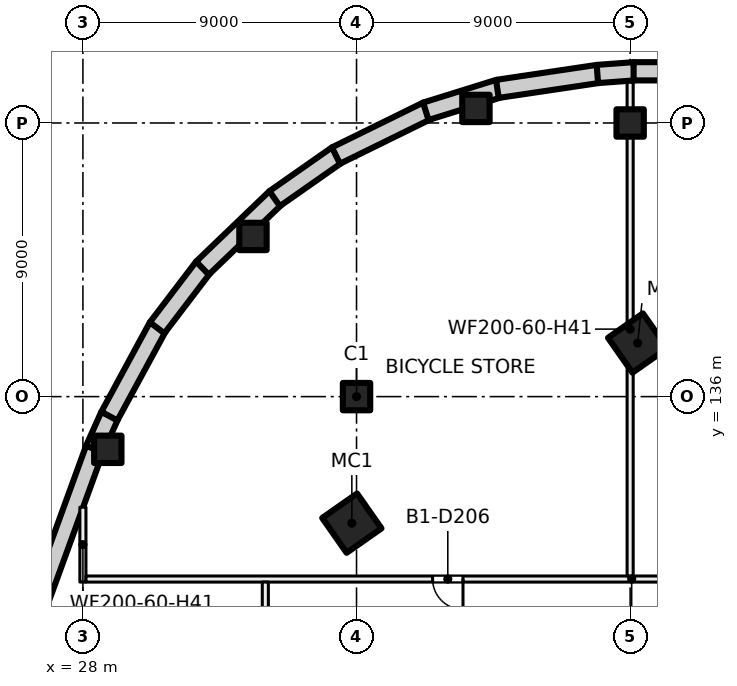
"""IFC4 building model, lengths in metres.
Left out: names, types, materials, properties, quantities, classifications, styles, units other than length and angle.
Written with IfcOpenShell. Run it as: python <this file> out.ifc"""

import sys

from ifc_helpers import new_model, si_unit, direction, frame, frame_2d, origin, origin_2d, place, context, subcontext, project, spatial, rectangle, hollow_rectangle, extrude, element, fill, save


model = new_model("IFC4")
c1 = context("Model", 3, precision=1e-05, world=origin(), true_north=direction((0.0, 1.0)))
c2 = subcontext(c1, "Body", "Model", "MODEL_VIEW")
j1 = project(units=[si_unit("LENGTHUNIT", "METRE"), si_unit("PLANEANGLEUNIT", "RADIAN")], contexts=[c1])
p1 = place(None, origin())
s1 = spatial("IfcSite", under=j1, at=p1, CompositionType="ELEMENT")
p2 = place(p1, origin())
s2 = spatial("IfcBuilding", under=s1, at=p2, CompositionType="ELEMENT")
p3 = place(p2, frame((0.0, 0.0, -4.5)))
s3 = spatial("IfcBuildingStorey", under=s2, at=p3, CompositionType="ELEMENT", Elevation=-4.5)
p4 = place(p3, frame((12.199, 89.809, 0.0), z_axis=(0.0, 0.0, 1.0), x_axis=(0.342018444468, 0.939693239118, 0.0)))
e1 = element("IfcWall", 1, at=p4, inside=s3, PredefinedType="SHEAR", context=c2, shape_type="SweptSolid", body=[
    extrude(rectangle(XDim=47.334, YDim=0.6, at=frame_2d((23.667, 0.0))), origin(), (0.0, 0.0, 1.0), 4.5),
])
p5 = place(p3, frame((28.38, 134.268, 0.0), z_axis=(0.0, 0.0, 1.0), x_axis=(0.410489806774, 0.911865186601, 0.0)))
e2 = element("IfcWall", 2, at=p5, inside=s3, PredefinedType="SHEAR", context=c2, shape_type="SweptSolid", body=[
    extrude(rectangle(XDim=1.217, YDim=0.6, at=frame_2d((0.608, 0.0))), origin(), (0.0, 0.0, 1.0), 4.5),
])
p6 = place(p3, frame((28.87, 135.358, 0.0), z_axis=(0.0, 0.0, 1.0), x_axis=(0.476454595908, 0.879199077591, 0.0)))
e3 = element("IfcWall", 3, at=p6, inside=s3, PredefinedType="SHEAR", context=c2, shape_type="SweptSolid", body=[
    extrude(rectangle(XDim=3.349, YDim=0.6, at=frame_2d((1.674, 0.0))), origin(), (0.0, 0.0, 1.0), 4.5),
])
p7 = place(p3, frame((30.441, 138.263, 0.0), z_axis=(0.0, 0.0, 1.0), x_axis=(0.606063715653, 0.79541610027, 0.0)))
e4 = element("IfcWall", 4, at=p7, inside=s3, PredefinedType="SHEAR", context=c2, shape_type="SweptSolid", body=[
    extrude(rectangle(XDim=2.512, YDim=0.6, at=frame_2d((1.256, 0.0))), origin(), (0.0, 0.0, 1.0), 4.5),
])
p8 = place(p3, frame((31.932, 140.226, 0.0), z_axis=(0.0, 0.0, 1.0), x_axis=(0.721212073243, 0.692714331747, 0.0)))
e5 = element("IfcWall", 5, at=p8, inside=s3, PredefinedType="SHEAR", context=c2, shape_type="SweptSolid", body=[
    extrude(rectangle(XDim=3.341, YDim=0.6, at=frame_2d((1.67, 0.0))), origin(), (0.0, 0.0, 1.0), 4.5),
])
p9 = place(p3, frame((34.306, 142.511, 0.0), z_axis=(0.0, 0.0, 1.0), x_axis=(0.819136010061, 0.57359933492, 0.0)))
e6 = element("IfcWall", 6, at=p9, inside=s3, PredefinedType="SHEAR", context=c2, shape_type="SweptSolid", body=[
    extrude(rectangle(XDim=2.512, YDim=0.6, at=frame_2d((1.256, 0.0))), origin(), (0.0, 0.0, 1.0), 4.5),
])
p10 = place(p3, frame((36.323, 143.928, 0.0), z_axis=(0.0, 0.0, 1.0), x_axis=(0.897590342017, 0.440830554656, 0.0)))
e7 = element("IfcWall", 7, at=p10, inside=s3, PredefinedType="SHEAR", context=c2, shape_type="SweptSolid", body=[
    extrude(rectangle(XDim=3.341, YDim=0.6, at=frame_2d((1.671, 0.0))), origin(), (0.0, 0.0, 1.0), 4.5),
])
p11 = place(p3, frame((39.28, 145.384, 0.0), z_axis=(0.0, 0.0, 1.0), x_axis=(0.954711451083, 0.297533267335, 0.0)))
e8 = element("IfcWall", 8, at=p11, inside=s3, PredefinedType="SHEAR", context=c2, shape_type="SweptSolid", body=[
    extrude(rectangle(XDim=2.512, YDim=0.6, at=frame_2d((1.256, 0.0))), origin(), (0.0, 0.0, 1.0), 4.5),
])
p12 = place(p3, frame((41.632, 146.121, 0.0), z_axis=(0.0, 0.0, 1.0), x_axis=(0.989117960185, 0.14712464389, 0.0)))
e9 = element("IfcWall", 9, at=p12, inside=s3, PredefinedType="SHEAR", context=c2, shape_type="SweptSolid", body=[
    extrude(rectangle(XDim=3.349, YDim=0.6, at=frame_2d((1.674, 0.0))), origin(), (0.0, 0.0, 1.0), 4.5),
])
p13 = place(p3, frame((44.923, 146.611, 0.0), z_axis=(0.0, 0.0, 1.0), x_axis=(0.99726994401, 0.073842120603, 0.0)))
e10 = element("IfcWall", 10, at=p13, inside=s3, PredefinedType="SHEAR", context=c2, shape_type="SweptSolid", body=[
    extrude(rectangle(XDim=1.217, YDim=0.6, at=frame_2d((0.608, 0.0))), origin(), (0.0, 0.0, 1.0), 4.5),
])
p14 = place(p3, frame((46.114, 146.7, 0.0), z_axis=(0.0, 0.0, 1.0), x_axis=(1.0, 0.0, 0.0)))
e11 = element("IfcWall", 11, at=p14, inside=s3, PredefinedType="SHEAR", context=c2, shape_type="SweptSolid", body=[
    extrude(rectangle(XDim=59.364, YDim=0.6, at=frame_2d((29.682, 0.0))), origin(), (0.0, 0.0, 1.0), 4.5),
])
for number, where, z_axis, x_axis in (
    (12, (37.0, 136.0, 0.0), (0.0, 0.0, 1.0), (1.0, 0.0, 0.0)),
    (13, (46.0, 145.0, 0.0), (0.0, 0.0, 1.0), (1.0, 0.0, 0.0)),
    (14, (28.819, 134.267, 0.0), (0.0, 0.0, 1.0), (1.0, 0.0, 0.0)),
    (15, (33.594, 141.268, 0.0), (0.0, 0.0, 1.0), (1.0, 0.0, 0.0)),
    (16, (40.927, 145.479, 0.0), (0.0, 0.0, 1.0), (1.0, 0.0, 0.0)),
):
    element("IfcColumn", number, at=place(p3, frame(where, z_axis=z_axis, x_axis=x_axis)), inside=s3, PredefinedType="COLUMN", context=c2, shape_type="SweptSolid", body=[
        extrude(rectangle(XDim=0.9, YDim=0.9, at=origin_2d()), origin(), (0.0, 0.0, 1.0), 4.5),
    ])
for number, where, z_axis, x_axis in (
    (17, (36.846, 131.838, 0.0), (0.0, 0.0, 1.0), (0.574, -0.819, 0.0)),
    (18, (46.247, 137.762, 0.0), (0.0, 0.0, 1.0), (0.574, -0.819, 0.0)),
):
    element("IfcColumn", number, at=place(p3, frame(where, z_axis=z_axis, x_axis=x_axis)), inside=s3, PredefinedType="COLUMN", context=c2, shape_type="SweptSolid", body=[
        extrude(hollow_rectangle(XDim=1.4, YDim=1.4, WallThickness=0.04, at=origin_2d()), origin(), (0.0, 0.0, 1.0), 4.5),
    ])
p15 = place(p3, frame((28.0, 129.9, 0.0), z_axis=(0.0, 0.0, 1.0), x_axis=(0.0, 1.0, 0.0)))
e19 = element("IfcWall", 19, at=p15, inside=s3, PredefinedType="PARTITIONING", context=c2, shape_type="SweptSolid", body=[
    extrude(rectangle(XDim=2.463, YDim=0.2, at=frame_2d((1.231, 0.0))), origin(), (0.0, 0.0, 1.0), 4.1),
])
p16 = place(p3, frame((28.1, 130.0, 0.0), z_axis=(0.0, 0.0, 1.0), x_axis=(1.0, 0.0, 0.0)))
e20 = element("IfcWall", 20, at=p16, inside=s3, PredefinedType="PARTITIONING", context=c2, shape_type="SweptSolid", body=[
    extrude(rectangle(XDim=35.9, YDim=0.2, at=frame_2d((17.95, 0.0))), origin(), (0.0, 0.0, 1.0), 4.1),
])
p17 = place(p16, frame((11.402, 0.0, 0.0)))
e21 = element("IfcOpeningElement", 21, at=p17, cuts=e20, PredefinedType="OPENING", context=c2, shape_type="SweptSolid", body=[
    extrude(rectangle(XDim=1.0, YDim=2.1, at=frame_2d((0.5, 1.05))), frame((0.0, 0.11, 0.0), z_axis=(0.0, -1.0, 0.0), x_axis=(1.0, 0.0, 0.0)), (0.0, 0.0, 1.0), 0.22),
])
p18 = place(p16, frame((21.9, 0.0, 0.0)))
e22 = element("IfcOpeningElement", 22, at=p18, cuts=e20, PredefinedType="OPENING", context=c2, shape_type="SweptSolid", body=[
    extrude(rectangle(XDim=1.0, YDim=2.1, at=frame_2d((0.5, 1.05))), frame((0.0, 0.11, 0.0), z_axis=(0.0, -1.0, 0.0), x_axis=(1.0, 0.0, 0.0)), (0.0, 0.0, 1.0), 0.22),
])
p19 = place(p16, frame((30.898, 0.0, 0.0)))
e23 = element("IfcOpeningElement", 23, at=p19, cuts=e20, PredefinedType="OPENING", context=c2, shape_type="SweptSolid", body=[
    extrude(rectangle(XDim=1.0, YDim=2.1, at=frame_2d((0.5, 1.05))), frame((0.0, 0.11, 0.0), z_axis=(0.0, -1.0, 0.0), x_axis=(1.0, 0.0, 0.0)), (0.0, 0.0, 1.0), 0.22),
])
p20 = place(p3, frame((34.0, 126.1, 0.0), z_axis=(0.0, 0.0, 1.0), x_axis=(0.0, 1.0, 0.0)))
e24 = element("IfcWall", 24, at=p20, inside=s3, PredefinedType="PARTITIONING", context=c2, shape_type="SweptSolid", body=[
    extrude(rectangle(XDim=3.8, YDim=0.2, at=frame_2d((1.9, 0.0))), origin(), (0.0, 0.0, 1.0), 4.1),
])
p21 = place(p3, frame((46.0, 130.1, 0.0), z_axis=(0.0, 0.0, 1.0), x_axis=(0.0, 1.0, 0.0)))
e25 = element("IfcWall", 25, at=p21, inside=s3, PredefinedType="PARTITIONING", context=c2, shape_type="SweptSolid", body=[
    extrude(rectangle(XDim=16.24, YDim=0.2, at=frame_2d((8.12, 0.0))), origin(), (0.0, 0.0, 1.0), 4.1),
])
p22 = place(p17, origin())
e26 = element("IfcDoor", 26, at=p22, inside=s3, OperationType="SINGLE_SWING_RIGHT", PredefinedType="DOOR", context=c2, shape_type="SweptSolid", body=[
    extrude(rectangle(XDim=1.0, YDim=2.1, at=frame_2d((0.5, 1.05))), frame((0.0, 0.025, 0.0), z_axis=(0.0, -1.0, 0.0), x_axis=(1.0, 0.0, 0.0)), (0.0, 0.0, 1.0), 0.05),
])
fill(e21, e26)
save(model, sys.argv[1])
